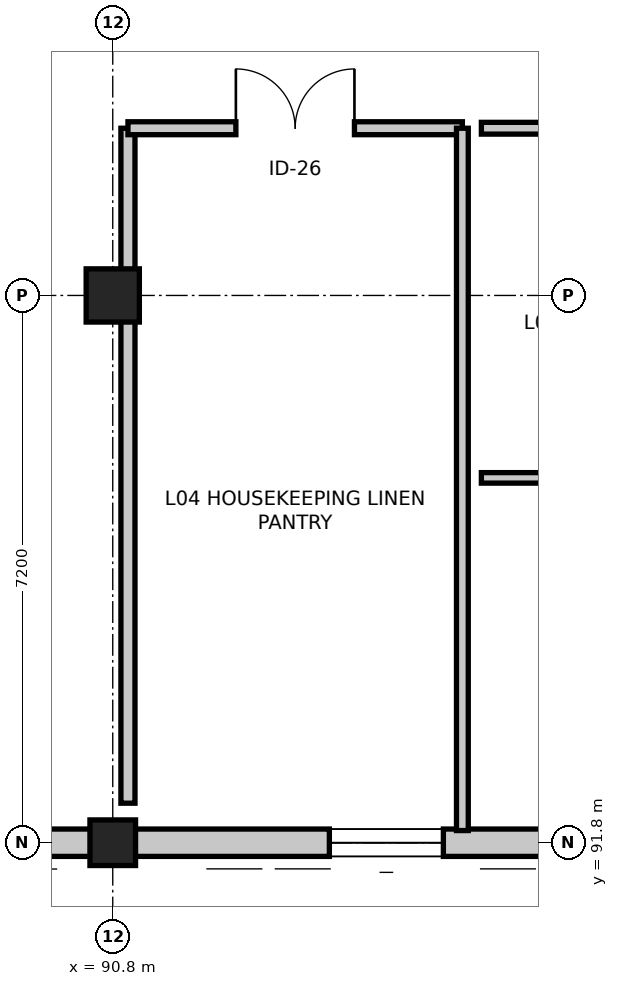
"""IFC4 building model, lengths in metres.
Left out: names, types, materials, properties, quantities, classifications, styles, units other than length and angle.
Written with IfcOpenShell. Run it as: python <this file> out.ifc"""

import sys

from ifc_helpers import new_model, si_unit, direction, frame, frame_2d, origin, origin_2d, place, context, subcontext, project, spatial, rectangle, extrude, element, fill, save


model = new_model("IFC4")
c1 = context("Model", 3, precision=1e-05, world=origin(), true_north=direction((0.0, 1.0)))
c2 = subcontext(c1, "Body", "Model", "MODEL_VIEW")
j1 = project(units=[si_unit("LENGTHUNIT", "METRE"), si_unit("PLANEANGLEUNIT", "RADIAN")], contexts=[c1])
p1 = place(None, origin())
s1 = spatial("IfcSite", under=j1, at=p1, CompositionType="ELEMENT")
p2 = place(p1, origin())
s2 = spatial("IfcBuilding", under=s1, at=p2, CompositionType="ELEMENT")
p3 = place(p2, frame((0.0, 0.0, 19.2)))
s3 = spatial("IfcBuildingStorey", under=s2, at=p3, CompositionType="ELEMENT", Elevation=19.2)
p4 = place(p3, frame((90.8, 91.8, 0.0), z_axis=(0.0, 0.0, 1.0), x_axis=(1.0, 0.0, 0.0)))
e1 = element("IfcColumn", 1, at=p4, inside=s3, PredefinedType="COLUMN", context=c2, shape_type="SweptSolid", body=[
    extrude(rectangle(XDim=0.6, YDim=0.6, at=origin_2d()), origin(), (0.0, 0.0, 1.0), 3.6),
])
p5 = place(p3, frame((90.8, 99.0, 0.0), z_axis=(0.0, 0.0, 1.0), x_axis=(1.0, 0.0, 0.0)))
e2 = element("IfcColumn", 2, at=p5, inside=s3, PredefinedType="COLUMN", context=c2, shape_type="SweptSolid", body=[
    extrude(rectangle(XDim=0.7, YDim=0.7, at=origin_2d()), origin(), (0.0, 0.0, 1.0), 3.6),
])
p6 = place(p3, frame((98.0, 91.8, 0.0), z_axis=(0.0, 0.0, 1.0), x_axis=(-1.0, 0.0, 0.0)))
e3 = element("IfcWall", 3, at=p6, inside=s3, PredefinedType="STANDARD", context=c2, shape_type="SweptSolid", body=[
    extrude(rectangle(XDim=7.2, YDim=0.36, at=frame_2d((3.6, 0.0))), origin(), (0.0, 0.0, 1.0), 2.735),
])
p7 = place(p6, frame((2.85, 0.0, 0.75)))
e4 = element("IfcOpeningElement", 4, at=p7, cuts=e3, PredefinedType="OPENING", context=c2, shape_type="SweptSolid", body=[
    extrude(rectangle(XDim=1.5, YDim=1.5, at=frame_2d((0.75, 0.75))), frame((0.0, 0.19, 0.0), z_axis=(0.0, -1.0, 0.0), x_axis=(1.0, 0.0, 0.0)), (0.0, 0.0, 1.0), 0.38),
])
p8 = place(p3, frame((90.8, 91.8, 0.0), z_axis=(0.0, 0.0, 1.0), x_axis=(-1.0, 0.0, 0.0)))
e5 = element("IfcWall", 5, at=p8, inside=s3, PredefinedType="STANDARD", context=c2, shape_type="SweptSolid", body=[
    extrude(rectangle(XDim=7.2, YDim=0.36, at=frame_2d((3.6, 0.0))), origin(), (0.0, 0.0, 1.0), 2.735),
])
p9 = place(p8, frame((2.7, 0.0, 0.75)))
e6 = element("IfcOpeningElement", 6, at=p9, cuts=e5, PredefinedType="OPENING", context=c2, shape_type="SweptSolid", body=[
    extrude(rectangle(XDim=1.8, YDim=1.5, at=frame_2d((0.9, 0.75))), frame((0.0, 0.19, 0.0), z_axis=(0.0, -1.0, 0.0), x_axis=(1.0, 0.0, 0.0)), (0.0, 0.0, 1.0), 0.38),
])
p10 = place(p3, frame((91.0, 92.32, 0.0), z_axis=(0.0, 0.0, 1.0), x_axis=(0.0, 1.0, 0.0)))
e7 = element("IfcWall", 7, at=p10, inside=s3, PredefinedType="PARTITIONING", context=c2, shape_type="SweptSolid", body=[
    extrude(rectangle(XDim=8.88, YDim=0.185, at=frame_2d((4.44, 0.0))), origin(), (0.0, 0.0, 1.0), 2.685),
])
p11 = place(p3, frame((91.0, 101.2, 0.0), z_axis=(0.0, 0.0, 1.0), x_axis=(1.0, 0.0, 0.0)))
e8 = element("IfcWall", 8, at=p11, inside=s3, PredefinedType="PARTITIONING", context=c2, shape_type="SweptSolid", body=[
    extrude(rectangle(XDim=4.4, YDim=0.17, at=frame_2d((2.2, 0.0))), origin(), (0.0, 0.0, 1.0), 2.685),
])
p12 = place(p11, frame((1.42, 0.0, 0.0)))
e9 = element("IfcOpeningElement", 9, at=p12, cuts=e8, PredefinedType="OPENING", context=c2, shape_type="SweptSolid", body=[
    extrude(rectangle(XDim=1.56, YDim=2.26, at=frame_2d((0.78, 1.13))), frame((0.0, 0.095, 0.0), z_axis=(0.0, -1.0, 0.0), x_axis=(1.0, 0.0, 0.0)), (0.0, 0.0, 1.0), 0.19),
])
p13 = place(p3, frame((95.4, 101.2, 0.0), z_axis=(0.0, 0.0, 1.0), x_axis=(0.0, -1.0, 0.0)))
e10 = element("IfcWall", 10, at=p13, inside=s3, PredefinedType="PARTITIONING", context=c2, shape_type="SweptSolid", body=[
    extrude(rectangle(XDim=9.24, YDim=0.155, at=frame_2d((4.62, 0.0))), origin(), (0.0, 0.0, 1.0), 2.735),
])
p14 = place(p3, frame((95.65, 101.2, 0.0), z_axis=(0.0, 0.0, 1.0), x_axis=(1.0, 0.0, 0.0)))
e11 = element("IfcWall", 11, at=p14, inside=s3, PredefinedType="PARTITIONING", context=c2, shape_type="SweptSolid", body=[
    extrude(rectangle(XDim=3.25, YDim=0.155, at=frame_2d((1.625, 0.0))), origin(), (0.0, 0.0, 1.0), 2.685),
])
p15 = place(p14, frame((0.875, 0.0, 0.0)))
e12 = element("IfcOpeningElement", 12, at=p15, cuts=e11, PredefinedType="OPENING", context=c2, shape_type="SweptSolid", body=[
    extrude(rectangle(XDim=1.5, YDim=2.2, at=frame_2d((0.75, 1.1))), frame((0.0, 0.087, 0.0), z_axis=(0.0, -1.0, 0.0), x_axis=(1.0, 0.0, 0.0)), (0.0, 0.0, 1.0), 0.175),
])
p16 = place(p3, frame((98.9, 96.6, 0.0), z_axis=(0.0, 0.0, 1.0), x_axis=(-1.0, 0.0, 0.0)))
e13 = element("IfcWall", 13, at=p16, inside=s3, PredefinedType="PARTITIONING", context=c2, shape_type="SweptSolid", body=[
    extrude(rectangle(XDim=3.25, YDim=0.138, at=frame_2d((1.625, 0.0))), origin(), (0.0, 0.0, 1.0), 2.685),
])
p17 = place(p7, origin())
e14 = element("IfcWindow", 14, at=p17, inside=s3, PartitioningType="SINGLE_PANEL", PredefinedType="WINDOW", context=c2, shape_type="SweptSolid", body=[
    extrude(rectangle(XDim=1.5, YDim=1.5, at=frame_2d((0.75, 0.75))), frame((0.0, 0.03, 0.0), z_axis=(0.0, -1.0, 0.0), x_axis=(1.0, 0.0, 0.0)), (0.0, 0.0, 1.0), 0.06),
])
fill(e4, e14)
p18 = place(p12, origin())
e15 = element("IfcDoor", 15, at=p18, inside=s3, OperationType="DOUBLE_DOOR_SINGLE_SWING", PredefinedType="DOOR", context=c2, shape_type="SweptSolid", body=[
    extrude(rectangle(XDim=1.56, YDim=2.26, at=frame_2d((0.78, 1.13))), frame((0.0, 0.025, 0.0), z_axis=(0.0, -1.0, 0.0), x_axis=(1.0, 0.0, 0.0)), (0.0, 0.0, 1.0), 0.05),
])
fill(e9, e15)
save(model, sys.argv[1])
